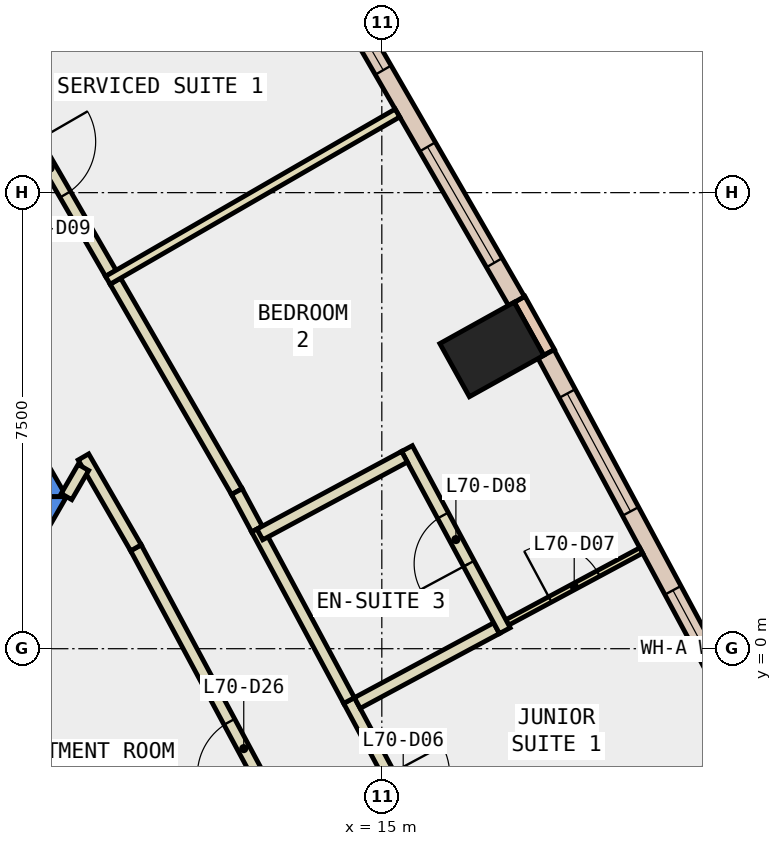
"""IFC4 building model, lengths in metres.
Left out: names, types, materials, properties, quantities, classifications, styles, units other than length and angle.
Written with IfcOpenShell. Run it as: python <this file> out.ifc"""

import sys

from ifc_helpers import new_model, si_unit, direction, frame, frame_2d, origin, origin_2d, place, context, subcontext, project, spatial, polyline, rectangle, outline, extrude, element, fill, save


model = new_model("IFC4")
c1 = context("Model", 3, precision=1e-05, world=origin(), true_north=direction((0.0, 1.0)))
c2 = subcontext(c1, "Body", "Model", "MODEL_VIEW")
j1 = project(units=[si_unit("LENGTHUNIT", "METRE"), si_unit("PLANEANGLEUNIT", "RADIAN")], contexts=[c1])
p1 = place(None, origin())
s1 = spatial("IfcSite", under=j1, at=p1, CompositionType="ELEMENT")
p2 = place(p1, origin())
s2 = spatial("IfcBuilding", under=s1, at=p2, CompositionType="ELEMENT")
p3 = place(p2, frame((0.0, 0.0, 300.8)))
s3 = spatial("IfcBuildingStorey", under=s2, at=p3, CompositionType="ELEMENT", Elevation=300.8)
for number, where, z_axis, x_axis in (
    (1, (20.714, -2.333, -0.34), (0.0, 0.0, 1.0), (-0.351, 0.936, 0.0)),
    (2, (16.809, 4.921, -0.34), (0.0, 0.0, 1.0), (-0.486, 0.874, 0.0)),
):
    element("IfcColumn", number, at=place(p3, frame(where, z_axis=z_axis, x_axis=x_axis)), inside=s3, PredefinedType="COLUMN", context=c2, shape_type="SweptSolid", body=[
        extrude(rectangle(XDim=1.0, YDim=1.4, at=origin_2d()), origin(), (0.0, 0.0, 1.0), 3.6),
    ])
p4 = place(p3, frame((0.0, 0.0, -0.34)))
e3 = element("IfcWall", 3, at=p4, inside=s3, PredefinedType="SHEAR", context=c2, shape_type="SweptSolid", body=[
    extrude(outline(polyline([(5.486, 9.998), (5.053, 9.748), (9.238, 2.5), (9.815, 2.5), (5.486, 9.998)])), origin(), (0.0, 0.0, 1.0), 3.6),
])
p5 = place(p3, frame((0.0, 0.0, -0.34)))
e4 = element("IfcWall", 4, at=p5, inside=s3, PredefinedType="SHEAR", context=c2, shape_type="SweptSolid", body=[
    extrude(outline(polyline([(4.907, -6.0), (9.815, 2.5), (9.238, 2.5), (4.619, -5.5), (4.907, -6.0)])), origin(), (0.0, 0.0, 1.0), 3.6),
])
p6 = place(p3, frame((17.752, 4.872, 0.0), z_axis=(0.0, 0.0, 1.0), x_axis=(-0.485850211157, 0.874042088414, 0.0)))
e5 = element("IfcWall", 5, at=p6, inside=s3, PredefinedType="STANDARD", context=c2, shape_type="SweptSolid", body=[
    extrude(rectangle(XDim=1.0, YDim=0.2, at=frame_2d((0.5, 0.0))), origin(), (0.0, 0.0, 1.0), 3.26),
])
p7 = place(p3, frame((21.177, -1.626, 0.0), z_axis=(0.0, 0.0, 1.0), x_axis=(-0.473225522632, 0.880941317415, 0.0)))
e6 = element("IfcWall", 6, at=p7, inside=s3, PredefinedType="STANDARD", context=c2, shape_type="SweptSolid", body=[
    extrude(rectangle(XDim=7.345, YDim=0.3, at=frame_2d((3.673, 0.0))), origin(), (0.0, 0.0, 1.0), 3.26),
])
p8 = place(p7, frame((0.736, 0.0, 0.9)))
e7 = element("IfcOpeningElement", 7, at=p8, cuts=e6, PredefinedType="OPENING", context=c2, shape_type="SweptSolid", body=[
    extrude(rectangle(XDim=2.2, YDim=2.0, at=frame_2d((1.1, 1.0))), frame((0.0, 0.16, 0.0), z_axis=(0.0, -1.0, 0.0), x_axis=(1.0, 0.0, 0.0)), (0.0, 0.0, 1.0), 0.32),
])
p9 = place(p7, frame((4.409, 0.0, 0.9)))
e8 = element("IfcOpeningElement", 8, at=p9, cuts=e6, PredefinedType="OPENING", context=c2, shape_type="SweptSolid", body=[
    extrude(rectangle(XDim=2.2, YDim=2.0, at=frame_2d((1.1, 1.0))), frame((0.0, 0.16, 0.0), z_axis=(0.0, -1.0, 0.0), x_axis=(1.0, 0.0, 0.0)), (0.0, 0.0, 1.0), 0.32),
])
p10 = place(p3, frame((17.215, 5.717, 0.0), z_axis=(0.0, 0.0, 1.0), x_axis=(-0.499905472729, 0.866079972252, 0.0)))
e9 = element("IfcWall", 9, at=p10, inside=s3, PredefinedType="STANDARD", context=c2, shape_type="SweptSolid", body=[
    extrude(rectangle(XDim=7.313, YDim=0.3, at=frame_2d((3.657, 0.0))), origin(), (0.0, 0.0, 1.0), 3.26),
])
p11 = place(p10, frame((0.728, 0.0, 0.9)))
e10 = element("IfcOpeningElement", 10, at=p11, cuts=e9, PredefinedType="OPENING", context=c2, shape_type="SweptSolid", body=[
    extrude(rectangle(XDim=2.2, YDim=2.0, at=frame_2d((1.1, 1.0))), frame((0.0, 0.16, 0.0), z_axis=(0.0, -1.0, 0.0), x_axis=(1.0, 0.0, 0.0)), (0.0, 0.0, 1.0), 0.32),
])
p12 = place(p10, frame((4.385, 0.0, 0.9)))
e11 = element("IfcOpeningElement", 11, at=p12, cuts=e9, PredefinedType="OPENING", context=c2, shape_type="SweptSolid", body=[
    extrude(rectangle(XDim=2.2, YDim=2.0, at=frame_2d((1.1, 1.0))), frame((0.0, 0.16, 0.0), z_axis=(0.0, -1.0, 0.0), x_axis=(1.0, 0.0, 0.0)), (0.0, 0.0, 1.0), 0.32),
])
p13 = place(p3, frame((14.503, -4.946, 0.0), z_axis=(0.0, 0.0, 1.0), x_axis=(-0.473101362557, 0.881008002658, 0.0)))
e12 = element("IfcWall", 12, at=p13, inside=s3, PredefinedType="PARTITIONING", context=c2, shape_type="SweptSolid", body=[
    extrude(rectangle(XDim=7.497, YDim=0.2, at=frame_2d((3.749, 0.0))), origin(), (0.0, 0.0, 1.0), 3.26),
])
p14 = place(p13, frame((3.249, 0.0, 0.0)))
e13 = element("IfcOpeningElement", 13, at=p14, cuts=e12, PredefinedType="OPENING", context=c2, shape_type="SweptSolid", body=[
    extrude(rectangle(XDim=1.0, YDim=2.1, at=frame_2d((0.5, 1.05))), frame((0.0, 0.11, 0.0), z_axis=(0.0, -1.0, 0.0), x_axis=(1.0, 0.0, 0.0)), (0.0, 0.0, 1.0), 0.22),
])
p15 = place(p3, frame((10.956, 1.659, 0.0), z_axis=(0.0, 0.0, 1.0), x_axis=(-0.49992648901, 0.866067841215, 0.0)))
e14 = element("IfcWall", 14, at=p15, inside=s3, PredefinedType="PARTITIONING", context=c2, shape_type="SweptSolid", body=[
    extrude(rectangle(XDim=1.726, YDim=0.2, at=frame_2d((0.863, 0.0))), origin(), (0.0, 0.0, 1.0), 3.26),
])
p16 = place(p3, frame((10.092, 2.981, 0.0), z_axis=(0.0, 0.0, 1.0), x_axis=(-0.501296484717, -0.865275582927, 0.0)))
e15 = element("IfcWall", 15, at=p16, inside=s3, PredefinedType="PARTITIONING", context=c2, shape_type="SweptSolid", body=[
    extrude(rectangle(XDim=0.555, YDim=0.2, at=frame_2d((0.277, 0.0))), origin(), (0.0, 0.0, 1.0), 3.26),
])
p17 = place(p3, frame((14.461, -0.852, 0.0), z_axis=(0.0, 0.0, 1.0), x_axis=(0.473160180459, -0.88097641491, 0.0)))
e16 = element("IfcWall", 16, at=p17, inside=s3, PredefinedType="PARTITIONING", context=c2, shape_type="SweptSolid", body=[
    extrude(rectangle(XDim=3.766, YDim=0.2, at=frame_2d((1.883, 0.0))), origin(), (0.0, 0.0, 1.0), 3.26),
])
p18 = place(p17, frame((1.383, 0.0, 0.0)))
e17 = element("IfcOpeningElement", 17, at=p18, cuts=e16, PredefinedType="OPENING", context=c2, shape_type="SweptSolid", body=[
    extrude(rectangle(XDim=1.0, YDim=2.1, at=frame_2d((0.5, 1.05))), frame((0.0, 0.11, 0.0), z_axis=(0.0, -1.0, 0.0), x_axis=(1.0, 0.0, 0.0)), (0.0, 0.0, 1.0), 0.22),
])
p19 = place(p3, frame((10.618, 6.044, 0.0), z_axis=(0.0, 0.0, 1.0), x_axis=(0.50008212199, -0.86597798544, 0.0)))
e18 = element("IfcWall", 18, at=p19, inside=s3, PredefinedType="PARTITIONING", context=c2, shape_type="SweptSolid", body=[
    extrude(rectangle(XDim=3.995, YDim=0.2, at=frame_2d((1.998, 0.0))), origin(), (0.0, 0.0, 1.0), 3.26),
])
p20 = place(p3, frame((12.616, 2.584, 0.0), z_axis=(0.0, 0.0, 1.0), x_axis=(0.472830911699, -0.881153181315, 0.0)))
e19 = element("IfcWall", 19, at=p20, inside=s3, PredefinedType="PARTITIONING", context=c2, shape_type="SweptSolid", body=[
    extrude(rectangle(XDim=0.7, YDim=0.2, at=frame_2d((0.35, 0.0))), origin(), (0.0, 0.0, 1.0), 3.26),
])
p21 = place(p3, frame((12.947, 1.967, 0.0), z_axis=(0.0, 0.0, 1.0), x_axis=(0.473116768279, -0.88099972961, 0.0)))
e20 = element("IfcWall", 20, at=p21, inside=s3, PredefinedType="PARTITIONING", context=c2, shape_type="SweptSolid", body=[
    extrude(rectangle(XDim=3.2, YDim=0.2, at=frame_2d((1.6, 0.0))), origin(), (0.0, 0.0, 1.0), 3.26),
])
p22 = place(p3, frame((8.545, 9.634, 0.0), z_axis=(0.0, 0.0, 1.0), x_axis=(0.50008212199, -0.86597798544, 0.0)))
e21 = element("IfcWall", 21, at=p22, inside=s3, PredefinedType="PARTITIONING", context=c2, shape_type="SweptSolid", body=[
    extrude(rectangle(XDim=3.995, YDim=0.2, at=frame_2d((1.998, 0.0))), origin(), (0.0, 0.0, 1.0), 3.26),
])
p23 = place(p22, frame((1.498, 0.0, 0.0)))
e22 = element("IfcOpeningElement", 22, at=p23, cuts=e21, PredefinedType="OPENING", context=c2, shape_type="SweptSolid", body=[
    extrude(rectangle(XDim=1.0, YDim=2.1, at=frame_2d((0.5, 1.05))), frame((0.0, 0.11, 0.0), z_axis=(0.0, -1.0, 0.0), x_axis=(1.0, 0.0, 0.0)), (0.0, 0.0, 1.0), 0.22),
])
p24 = place(p3, frame((17.063, 0.432, 0.0), z_axis=(0.0, 0.0, 1.0), x_axis=(0.881003472222, 0.473109799024, 0.0)))
e23 = element("IfcWall", 23, at=p24, inside=s3, PredefinedType="PARTITIONING", context=c2, shape_type="SweptSolid", body=[
    extrude(rectangle(XDim=2.501, YDim=0.1, at=frame_2d((1.25, 0.0))), origin(), (0.0, 0.0, 1.0), 3.26),
])
p25 = place(p24, frame((0.8, 0.0, 0.0)))
e24 = element("IfcOpeningElement", 24, at=p25, cuts=e23, PredefinedType="OPENING", context=c2, shape_type="SweptSolid", body=[
    extrude(rectangle(XDim=0.9, YDim=2.1, at=frame_2d((0.45, 1.05))), frame((0.0, 0.06, 0.0), z_axis=(0.0, -1.0, 0.0), x_axis=(1.0, 0.0, 0.0)), (0.0, 0.0, 1.0), 0.12),
])
p26 = place(p3, frame((14.597, -0.893, 0.0), z_axis=(0.0, 0.0, 1.0), x_axis=(0.880971229432, 0.473169835168, 0.0)))
e25 = element("IfcWall", 25, at=p26, inside=s3, PredefinedType="PARTITIONING", context=c2, shape_type="SweptSolid", body=[
    extrude(rectangle(XDim=2.599, YDim=0.2, at=frame_2d((1.3, 0.0))), origin(), (0.0, 0.0, 1.0), 3.26),
])
p27 = place(p3, frame((17.023, 0.297, 0.0), z_axis=(0.0, 0.0, 1.0), x_axis=(-0.473247398557, 0.88092956572, 0.0)))
e26 = element("IfcWall", 26, at=p27, inside=s3, PredefinedType="PARTITIONING", context=c2, shape_type="SweptSolid", body=[
    extrude(rectangle(XDim=3.4, YDim=0.2, at=frame_2d((1.7, 0.0))), origin(), (0.0, 0.0, 1.0), 3.26),
])
p28 = place(p27, frame((1.25, 0.0, 0.0)))
e27 = element("IfcOpeningElement", 27, at=p28, cuts=e26, PredefinedType="OPENING", context=c2, shape_type="SweptSolid", body=[
    extrude(rectangle(XDim=0.9, YDim=2.1, at=frame_2d((0.45, 1.05))), frame((0.0, 0.11, 0.0), z_axis=(0.0, -1.0, 0.0), x_axis=(1.0, 0.0, 0.0)), (0.0, 0.0, 1.0), 0.22),
])
p29 = place(p3, frame((15.373, 3.157, 0.0), z_axis=(0.0, 0.0, 1.0), x_axis=(-0.880935111027, -0.473237076062, 0.0)))
e28 = element("IfcWall", 28, at=p29, inside=s3, PredefinedType="PARTITIONING", context=c2, shape_type="SweptSolid", body=[
    extrude(rectangle(XDim=2.701, YDim=0.2, at=frame_2d((1.35, 0.0))), origin(), (0.0, 0.0, 1.0), 3.26),
])
p30 = place(p3, frame((10.494, 6.059, 0.0), z_axis=(0.0, 0.0, 1.0), x_axis=(0.866027397988, 0.499996545922, 0.0)))
e29 = element("IfcWall", 29, at=p30, inside=s3, PredefinedType="PARTITIONING", context=c2, shape_type="SweptSolid", body=[
    extrude(rectangle(XDim=5.5, YDim=0.15, at=frame_2d((2.75, 0.0))), origin(), (0.0, 0.0, 1.0), 3.26),
])
p31 = place(p8, origin())
e30 = element("IfcWindow", 30, at=p31, inside=s3, PartitioningType="SINGLE_PANEL", PredefinedType="WINDOW", context=c2, shape_type="SweptSolid", body=[
    extrude(rectangle(XDim=2.2, YDim=2.0, at=frame_2d((1.1, 1.0))), frame((0.0, 0.03, 0.0), z_axis=(0.0, -1.0, 0.0), x_axis=(1.0, 0.0, 0.0)), (0.0, 0.0, 1.0), 0.06),
])
fill(e7, e30)
p32 = place(p9, origin())
e31 = element("IfcWindow", 31, at=p32, inside=s3, PartitioningType="SINGLE_PANEL", PredefinedType="WINDOW", context=c2, shape_type="SweptSolid", body=[
    extrude(rectangle(XDim=2.2, YDim=2.0, at=frame_2d((1.1, 1.0))), frame((0.0, 0.03, 0.0), z_axis=(0.0, -1.0, 0.0), x_axis=(1.0, 0.0, 0.0)), (0.0, 0.0, 1.0), 0.06),
])
fill(e8, e31)
p33 = place(p11, origin())
e32 = element("IfcWindow", 32, at=p33, inside=s3, PartitioningType="SINGLE_PANEL", PredefinedType="WINDOW", context=c2, shape_type="SweptSolid", body=[
    extrude(rectangle(XDim=2.2, YDim=2.0, at=frame_2d((1.1, 1.0))), frame((0.0, 0.03, 0.0), z_axis=(0.0, -1.0, 0.0), x_axis=(1.0, 0.0, 0.0)), (0.0, 0.0, 1.0), 0.06),
])
fill(e10, e32)
p34 = place(p12, origin())
e33 = element("IfcWindow", 33, at=p34, inside=s3, PartitioningType="SINGLE_PANEL", PredefinedType="WINDOW", context=c2, shape_type="SweptSolid", body=[
    extrude(rectangle(XDim=2.2, YDim=2.0, at=frame_2d((1.1, 1.0))), frame((0.0, 0.03, 0.0), z_axis=(0.0, -1.0, 0.0), x_axis=(1.0, 0.0, 0.0)), (0.0, 0.0, 1.0), 0.06),
])
fill(e11, e33)
p35 = place(p25, origin())
e34 = element("IfcDoor", 34, at=p35, inside=s3, OperationType="SINGLE_SWING_LEFT", PredefinedType="DOOR", context=c2, shape_type="SweptSolid", body=[
    extrude(rectangle(XDim=0.9, YDim=2.1, at=frame_2d((0.45, 1.05))), frame((0.0, 0.025, 0.0), z_axis=(0.0, -1.0, 0.0), x_axis=(1.0, 0.0, 0.0)), (0.0, 0.0, 1.0), 0.05),
])
fill(e24, e34)
p36 = place(p28, origin())
e35 = element("IfcDoor", 35, at=p36, inside=s3, OperationType="SINGLE_SWING_LEFT", PredefinedType="DOOR", context=c2, shape_type="SweptSolid", body=[
    extrude(rectangle(XDim=0.9, YDim=2.1, at=frame_2d((0.45, 1.05))), frame((0.0, 0.025, 0.0), z_axis=(0.0, -1.0, 0.0), x_axis=(1.0, 0.0, 0.0)), (0.0, 0.0, 1.0), 0.05),
])
fill(e27, e35)
p37 = place(p23, origin())
e36 = element("IfcDoor", 36, at=p37, inside=s3, OperationType="SINGLE_SWING_LEFT", PredefinedType="DOOR", context=c2, shape_type="SweptSolid", body=[
    extrude(rectangle(XDim=1.0, YDim=2.1, at=frame_2d((0.5, 1.05))), frame((0.0, 0.025, 0.0), z_axis=(0.0, -1.0, 0.0), x_axis=(1.0, 0.0, 0.0)), (0.0, 0.0, 1.0), 0.05),
])
fill(e22, e36)
p38 = place(p14, origin())
e37 = element("IfcDoor", 37, at=p38, inside=s3, OperationType="SINGLE_SWING_LEFT", PredefinedType="DOOR", context=c2, shape_type="SweptSolid", body=[
    extrude(rectangle(XDim=1.0, YDim=2.1, at=frame_2d((0.5, 1.05))), frame((0.0, 0.025, 0.0), z_axis=(0.0, -1.0, 0.0), x_axis=(1.0, 0.0, 0.0)), (0.0, 0.0, 1.0), 0.05),
])
fill(e13, e37)
save(model, sys.argv[1])
